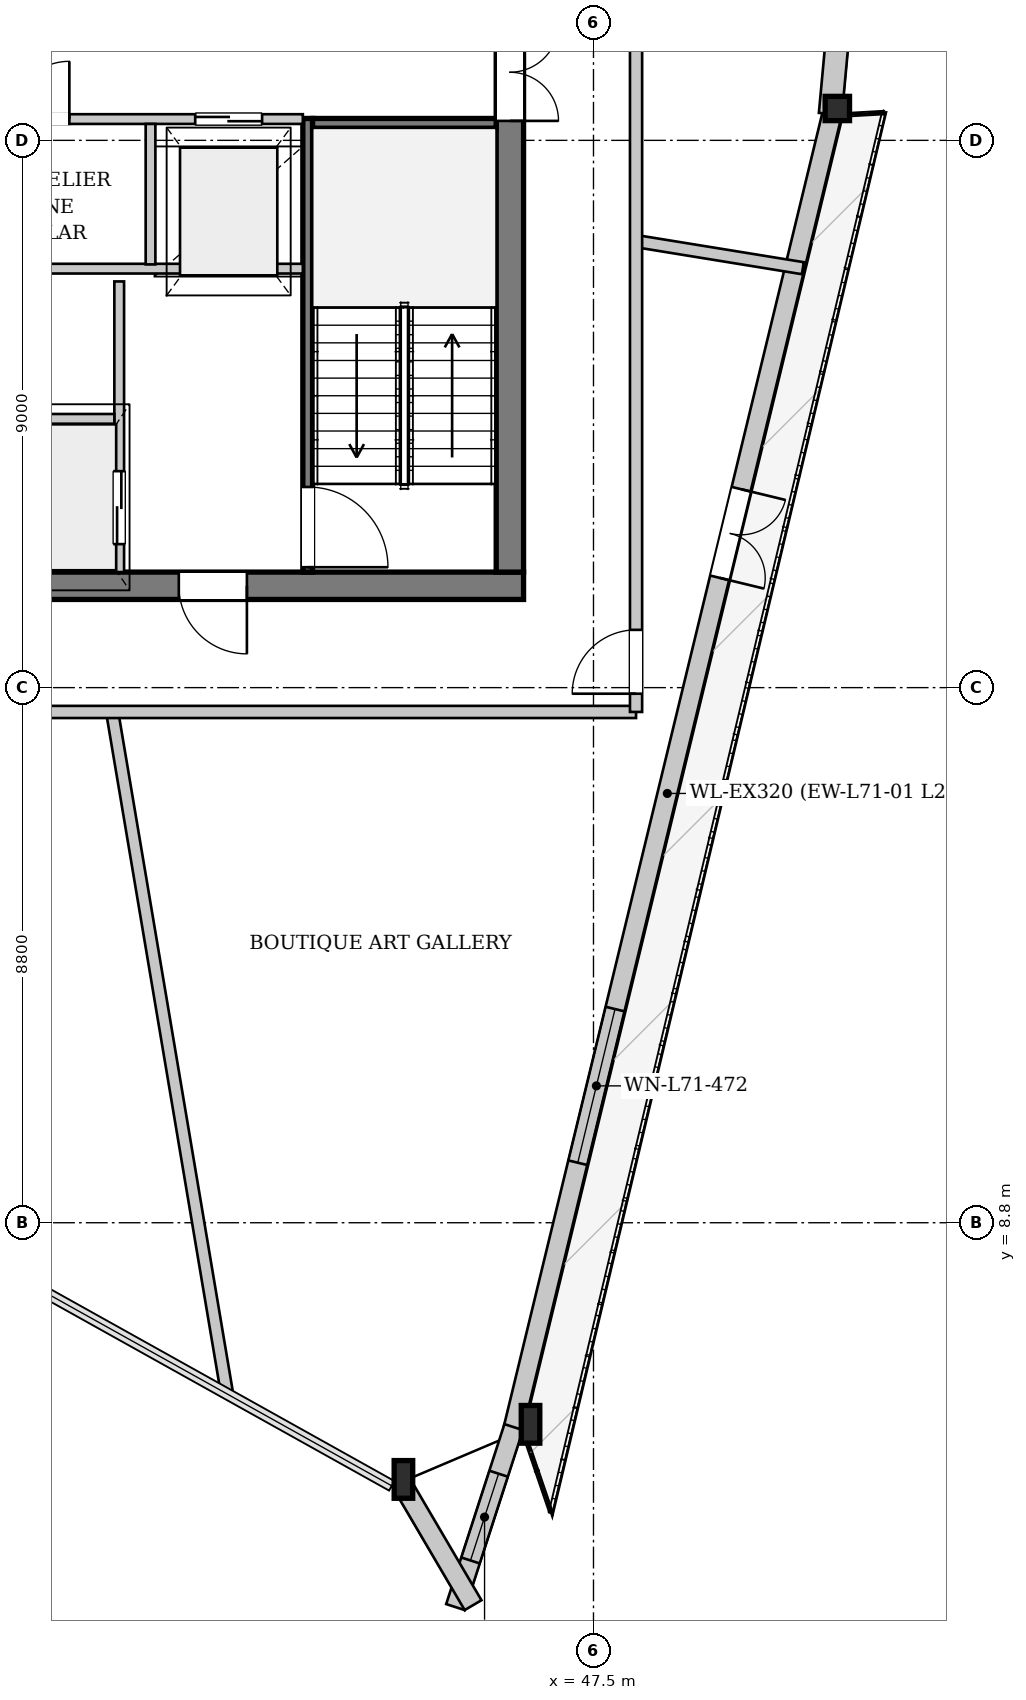
"""IFC4 building model, lengths in metres.
Left out: names, types, materials, properties, quantities, classifications, styles, units other than length and angle.
Written with IfcOpenShell. Run it as: python <this file> out.ifc"""

import sys

from ifc_helpers import new_model, si_unit, direction, frame, frame_2d, origin, origin_2d, place, context, subcontext, project, spatial, rectangle, i_section, extrude, source, transform, mapped, element, fill, save


model = new_model("IFC4")
c1 = context("Model", 3, precision=1e-05, world=origin(), true_north=direction((0.0, 1.0)))
c2 = subcontext(c1, "Body", "Model", "MODEL_VIEW")
j1 = project(units=[si_unit("LENGTHUNIT", "METRE"), si_unit("PLANEANGLEUNIT", "RADIAN")], contexts=[c1])
p1 = place(None, origin())
s1 = spatial("IfcSite", under=j1, at=p1, CompositionType="ELEMENT")
p2 = place(p1, origin())
s2 = spatial("IfcBuilding", under=s1, at=p2, CompositionType="ELEMENT")
p3 = place(p2, frame((0.0, 0.0, 266.9)))
s3 = spatial("IfcBuildingStorey", under=s2, at=p3, CompositionType="ELEMENT", Elevation=266.9)
m1 = source(origin(), c2, "Body", "SweptSolid", [
    extrude(i_section(OverallWidth=0.305, OverallDepth=0.62, WebThickness=0.021, FlangeThickness=0.04, at=origin_2d()), origin(), (0.0, 0.0, 1.0), 3.463),
])
p4 = place(p3, frame((44.182, 4.474, 0.0), z_axis=(0.111110442857, 0.060631333031, 0.991956809011), x_axis=(-0.479008221183, 0.877810414633, 0.0)))
e1 = element("IfcColumn", 1, at=p4, inside=s3, PredefinedType="COLUMN", context=c2, shape_type="MappedRepresentation", body=[
    mapped(m1, transform((0.0, 0.0, 0.0), x_axis=(1.0, 0.0, 0.0), y_axis=(0.0, 1.0, 0.0), z_axis=(0.0, 0.0, 1.0), scale=1.0)),
])
m2 = source(origin(), c2, "Body", "SweptSolid", [
    extrude(i_section(OverallWidth=0.305, OverallDepth=0.62, WebThickness=0.021, FlangeThickness=0.04, at=origin_2d()), origin(), (0.0, 0.0, 1.0), 3.449),
])
p5 = place(p3, frame((46.34, 5.39, 0.0), z_axis=(0.072476279359, 0.055206540918, 0.995841065015), x_axis=(-0.605949586805, 0.795503047292, 0.0)))
e2 = element("IfcColumn", 2, at=p5, inside=s3, PredefinedType="COLUMN", context=c2, shape_type="MappedRepresentation", body=[
    mapped(m2, transform((0.0, 0.0, 0.0), x_axis=(1.0, 0.0, 0.0), y_axis=(0.0, 1.0, 0.0), z_axis=(0.0, 0.0, 1.0), scale=1.0)),
])
m3 = source(origin(), c2, "Body", "SweptSolid", [
    extrude(i_section(OverallWidth=0.401, OverallDepth=0.399, WebThickness=0.022, FlangeThickness=0.034, at=origin_2d()), origin(), (0.0, 0.0, 1.0), 3.445),
])
p6 = place(p3, frame((51.585, 27.017, 0.0), z_axis=(-0.043442434865, 0.062151737972, 0.997120813302), x_axis=(-0.819626884118, -0.572897696653, 0.0)))
e3 = element("IfcColumn", 3, at=p6, inside=s3, PredefinedType="COLUMN", context=c2, shape_type="MappedRepresentation", body=[
    mapped(m3, transform((0.0, 0.0, 0.0), x_axis=(1.0, 0.0, 0.0), y_axis=(0.0, 1.0, 0.0), z_axis=(0.0, 0.0, 1.0), scale=1.0)),
])
p7 = place(p3, frame((51.43, 27.055, 0.0), z_axis=(0.0, 0.0, 1.0), x_axis=(-0.235712431361, -0.97182284893, 0.0)))
e4 = element("IfcWall", 4, at=p7, inside=s3, PredefinedType="SOLIDWALL", context=c2, shape_type="SweptSolid", body=[
    extrude(rectangle(XDim=22.254, YDim=0.32, at=frame_2d((11.127, 0.0))), origin(), (0.0, 0.0, 1.0), 2.872),
])
p8 = place(p7, frame((6.371, 0.0, 0.0)))
e5 = element("IfcOpeningElement", 5, at=p8, cuts=e4, PredefinedType="OPENING", context=c2, shape_type="SweptSolid", body=[
    extrude(rectangle(XDim=1.5, YDim=2.3, at=frame_2d((0.75, 1.15))), frame((0.0, 0.17, 0.0), z_axis=(0.0, -1.0, 0.0), x_axis=(1.0, 0.0, 0.0)), (0.0, 0.0, 1.0), 0.34),
])
p9 = place(p7, frame((15.168, 0.0, 0.402)))
e6 = element("IfcOpeningElement", 6, at=p9, cuts=e4, PredefinedType="OPENING", context=c2, shape_type="SweptSolid", body=[
    extrude(rectangle(XDim=2.6, YDim=2.35, at=frame_2d((1.3, 1.175))), frame((0.0, 0.17, 0.0), z_axis=(0.0, -1.0, 0.0), x_axis=(1.0, 0.0, 0.0)), (0.0, 0.0, 1.0), 0.34),
])
p10 = place(p3, frame((46.187, 5.439, 0.0), z_axis=(0.0, 0.0, 1.0), x_axis=(-0.307903872404, -0.951417471649, 0.0)))
e7 = element("IfcWall", 7, at=p10, inside=s3, PredefinedType="SOLIDWALL", context=c2, shape_type="SweptSolid", body=[
    extrude(rectangle(XDim=3.111, YDim=0.32, at=frame_2d((1.555, 0.0))), origin(), (0.0, 0.0, 1.0), 2.872),
])
p11 = place(p10, frame((0.805, 0.0, 0.452)))
e8 = element("IfcOpeningElement", 8, at=p11, cuts=e7, PredefinedType="OPENING", context=c2, shape_type="SweptSolid", body=[
    extrude(rectangle(XDim=1.5, YDim=2.3, at=frame_2d((0.75, 1.15))), frame((0.0, 0.17, 0.0), z_axis=(0.0, -1.0, 0.0), x_axis=(1.0, 0.0, 0.0)), (0.0, 0.0, 1.0), 0.34),
])
p12 = place(p3, frame((45.52, 2.511, 0.0), z_axis=(0.0, 0.0, 1.0), x_axis=(-0.506290522804, 0.862362978402, 0.0)))
e9 = element("IfcWall", 9, at=p12, inside=s3, PredefinedType="SOLIDWALL", context=c2, shape_type="SweptSolid", body=[
    extrude(rectangle(XDim=2.37, YDim=0.32, at=frame_2d((1.185, 0.0))), origin(), (0.0, 0.0, 1.0), 2.872),
])
p13 = place(p3, frame((53.439, 49.195, 0.0), z_axis=(0.0, 0.0, 1.0), x_axis=(-0.091800782473, -0.995777392964, 0.0)))
e10 = element("IfcWall", 10, at=p13, inside=s3, PredefinedType="SOLIDWALL", context=c2, shape_type="SweptSolid", body=[
    extrude(rectangle(XDim=22.254, YDim=0.38, at=frame_2d((11.127, 0.0))), origin(), (0.0, 0.0, 1.0), 2.872),
])
p14 = place(p13, frame((5.331, 0.0, 0.502)))
e11 = element("IfcOpeningElement", 11, at=p14, cuts=e10, PredefinedType="OPENING", context=c2, shape_type="SweptSolid", body=[
    extrude(rectangle(XDim=2.2, YDim=2.25, at=frame_2d((1.1, 1.125))), frame((0.0, 0.2, 0.0), z_axis=(0.0, -1.0, 0.0), x_axis=(1.0, 0.0, 0.0)), (0.0, 0.0, 1.0), 0.4),
])
p15 = place(p13, frame((14.923, 0.0, 0.502)))
e12 = element("IfcOpeningElement", 12, at=p15, cuts=e10, PredefinedType="OPENING", context=c2, shape_type="SweptSolid", body=[
    extrude(rectangle(XDim=2.2, YDim=2.25, at=frame_2d((1.1, 1.125))), frame((0.0, 0.2, 0.0), z_axis=(0.0, -1.0, 0.0), x_axis=(1.0, 0.0, 0.0)), (0.0, 0.0, 1.0), 0.4),
])
p16 = place(p3, frame((46.35, 19.275, 0.0), z_axis=(0.0, 0.0, 1.0), x_axis=(-1.0, 0.0, 0.0)))
e13 = element("IfcWall", 13, at=p16, inside=s3, PredefinedType="SHEAR", context=c2, shape_type="SweptSolid", body=[
    extrude(rectangle(XDim=16.7, YDim=0.45, at=frame_2d((8.35, 0.0))), origin(), (0.0, 0.0, 1.0), 3.38),
])
p17 = place(p16, frame((4.55, 0.0, 0.0)))
e14 = element("IfcOpeningElement", 14, at=p17, cuts=e13, PredefinedType="OPENING", context=c2, shape_type="SweptSolid", body=[
    extrude(rectangle(XDim=1.12, YDim=2.25, at=frame_2d((0.56, 1.125))), frame((0.0, 0.235, 0.0), z_axis=(0.0, -1.0, 0.0), x_axis=(1.0, 0.0, 0.0)), (0.0, 0.0, 1.0), 0.47),
])
p18 = place(p16, frame((11.05, 0.0, 0.0)))
e15 = element("IfcOpeningElement", 15, at=p18, cuts=e13, PredefinedType="OPENING", context=c2, shape_type="SweptSolid", body=[
    extrude(rectangle(XDim=1.12, YDim=2.25, at=frame_2d((0.56, 1.125))), frame((0.0, 0.235, 0.0), z_axis=(0.0, -1.0, 0.0), x_axis=(1.0, 0.0, 0.0)), (0.0, 0.0, 1.0), 0.47),
])
p19 = place(p3, frame((46.125, 33.7, 0.0), z_axis=(0.0, 0.0, 1.0), x_axis=(0.0, -1.0, 0.0)))
e16 = element("IfcWall", 16, at=p19, inside=s3, PredefinedType="SHEAR", context=c2, shape_type="SweptSolid", body=[
    extrude(rectangle(XDim=14.2, YDim=0.45, at=frame_2d((7.1, 0.0))), origin(), (0.0, 0.0, 1.0), 3.38),
])
p20 = place(p19, frame((5.18, 0.0, 0.0)))
e17 = element("IfcOpeningElement", 17, at=p20, cuts=e16, PredefinedType="OPENING", context=c2, shape_type="SweptSolid", body=[
    extrude(rectangle(XDim=1.6, YDim=2.2, at=frame_2d((0.8, 1.1))), frame((0.0, 0.235, 0.0), z_axis=(0.0, -1.0, 0.0), x_axis=(1.0, 0.0, 0.0)), (0.0, 0.0, 1.0), 0.47),
])
p21 = place(p19, frame((2.05, 0.0, 0.0)))
e18 = element("IfcOpeningElement", 18, at=p21, cuts=e16, PredefinedType="OPENING", context=c2, shape_type="SweptSolid", body=[
    extrude(rectangle(XDim=0.95, YDim=2.1, at=frame_2d((0.475, 1.05))), frame((0.0, 0.235, 0.0), z_axis=(0.0, -1.0, 0.0), x_axis=(1.0, 0.0, 0.0)), (0.0, 0.0, 1.0), 0.47),
])
p22 = place(p3, frame((42.8, 26.96, 0.0), z_axis=(0.0, 0.0, 1.0), x_axis=(0.0, -1.0, 0.0)))
e19 = element("IfcWall", 19, at=p22, inside=s3, PredefinedType="PARTITIONING", context=c2, shape_type="SweptSolid", body=[
    extrude(rectangle(XDim=7.46, YDim=0.16, at=frame_2d((3.73, 0.0))), origin(), (0.0, 0.0, 1.0), 3.38),
])
p23 = place(p22, frame((6.06, 0.0, 0.0)))
e20 = element("IfcOpeningElement", 20, at=p23, cuts=e19, PredefinedType="OPENING", context=c2, shape_type="SweptSolid", body=[
    extrude(rectangle(XDim=1.32, YDim=2.2, at=frame_2d((0.66, 1.1))), frame((0.0, 0.09, 0.0), z_axis=(0.0, -1.0, 0.0), x_axis=(1.0, 0.0, 0.0)), (0.0, 0.0, 1.0), 0.18),
])
p24 = place(p3, frame((42.88, 26.88, 0.0), z_axis=(0.0, 0.0, 1.0), x_axis=(1.0, 0.0, 0.0)))
e21 = element("IfcWall", 21, at=p24, inside=s3, PredefinedType="PARTITIONING", context=c2, shape_type="SweptSolid", body=[
    extrude(rectangle(XDim=3.02, YDim=0.16, at=frame_2d((1.51, 0.0))), origin(), (0.0, 0.0, 1.0), 3.38),
])
p25 = place(p3, frame((39.7, 24.28, 0.0), z_axis=(0.0, 0.0, 1.0), x_axis=(0.0, -1.0, 0.0)))
e22 = element("IfcWall", 22, at=p25, inside=s3, PredefinedType="PARTITIONING", context=c2, shape_type="SweptSolid", body=[
    extrude(rectangle(XDim=4.78, YDim=0.16, at=frame_2d((2.39, 0.0))), origin(), (0.0, 0.0, 1.0), 3.38),
])
p26 = place(p25, frame((3.12, 0.0, 0.0)))
e23 = element("IfcOpeningElement", 23, at=p26, cuts=e22, PredefinedType="OPENING", context=c2, shape_type="SweptSolid", body=[
    extrude(rectangle(XDim=1.2, YDim=2.2, at=frame_2d((0.6, 1.1))), frame((0.0, 0.09, 0.0), z_axis=(0.0, -1.0, 0.0), x_axis=(1.0, 0.0, 0.0)), (0.0, 0.0, 1.0), 0.18),
])
p27 = place(p3, frame((36.38, 22.02, 0.0), z_axis=(0.0, 0.0, 1.0), x_axis=(1.0, 0.0, 0.0)))
e24 = element("IfcWall", 24, at=p27, inside=s3, PredefinedType="PARTITIONING", context=c2, shape_type="SweptSolid", body=[
    extrude(rectangle(XDim=3.24, YDim=0.16, at=frame_2d((1.62, 0.0))), origin(), (0.0, 0.0, 1.0), 3.38),
])
p28 = place(p3, frame((33.28, 24.49, 0.0), z_axis=(0.0, 0.0, 1.0), x_axis=(1.0, 0.0, 0.0)))
e25 = element("IfcWall", 25, at=p28, inside=s3, PredefinedType="PARTITIONING", context=c2, shape_type="SweptSolid", body=[
    extrude(rectangle(XDim=9.44, YDim=0.16, at=frame_2d((4.72, 0.0))), origin(), (0.0, 0.0, 1.0), 3.38),
])
p29 = place(p3, frame((33.28, 26.95, 0.0), z_axis=(0.0, 0.0, 1.0), x_axis=(1.0, 0.0, 0.0)))
e26 = element("IfcWall", 26, at=p29, inside=s3, PredefinedType="PARTITIONING", context=c2, shape_type="SweptSolid", body=[
    extrude(rectangle(XDim=9.44, YDim=0.16, at=frame_2d((4.72, 0.0))), origin(), (0.0, 0.0, 1.0), 3.38),
])
p30 = place(p29, frame((1.2, 0.0, 0.0)))
e27 = element("IfcOpeningElement", 27, at=p30, cuts=e26, PredefinedType="OPENING", context=c2, shape_type="SweptSolid", body=[
    extrude(rectangle(XDim=0.95, YDim=2.1, at=frame_2d((0.475, 1.05))), frame((0.0, 0.09, 0.0), z_axis=(0.0, -1.0, 0.0), x_axis=(1.0, 0.0, 0.0)), (0.0, 0.0, 1.0), 0.18),
])
p31 = place(p29, frame((4.65, 0.0, 0.0)))
e28 = element("IfcOpeningElement", 28, at=p31, cuts=e26, PredefinedType="OPENING", context=c2, shape_type="SweptSolid", body=[
    extrude(rectangle(XDim=0.95, YDim=2.1, at=frame_2d((0.475, 1.05))), frame((0.0, 0.09, 0.0), z_axis=(0.0, -1.0, 0.0), x_axis=(1.0, 0.0, 0.0)), (0.0, 0.0, 1.0), 0.18),
])
p32 = place(p29, frame((7.67, 0.0, 0.0)))
e29 = element("IfcOpeningElement", 29, at=p32, cuts=e26, PredefinedType="OPENING", context=c2, shape_type="SweptSolid", body=[
    extrude(rectangle(XDim=1.1, YDim=2.2, at=frame_2d((0.55, 1.1))), frame((0.0, 0.09, 0.0), z_axis=(0.0, -1.0, 0.0), x_axis=(1.0, 0.0, 0.0)), (0.0, 0.0, 1.0), 0.18),
])
p33 = place(p3, frame((40.215, 24.56, 0.0), z_axis=(0.0, 0.0, 1.0), x_axis=(0.0, 1.0, 0.0)))
e30 = element("IfcWall", 30, at=p33, inside=s3, PredefinedType="PARTITIONING", context=c2, shape_type="SweptSolid", body=[
    extrude(rectangle(XDim=2.31, YDim=0.16, at=frame_2d((1.155, 0.0))), origin(), (0.0, 0.0, 1.0), 3.38),
])
p34 = place(p3, frame((39.584, 17.2, 0.0), z_axis=(0.0, 0.0, 1.0), x_axis=(0.166152121506, -0.98610013311, 0.0)))
e31 = element("IfcWall", 31, at=p34, inside=s3, PredefinedType="PARTITIONING", context=c2, shape_type="SweptSolid", body=[
    extrude(rectangle(XDim=11.335, YDim=0.2, at=frame_2d((5.667, 0.0))), origin(), (0.0, 0.0, 1.0), 3.38),
])
p35 = place(p3, frame((48.2, 24.943, 0.0), z_axis=(0.0, 0.0, 1.0), x_axis=(0.987066811554, -0.160309418091, 0.0)))
e32 = element("IfcWall", 32, at=p35, inside=s3, PredefinedType="PARTITIONING", context=c2, shape_type="SweptSolid", body=[
    extrude(rectangle(XDim=2.779, YDim=0.2, at=frame_2d((1.39, 0.0))), origin(), (0.0, 0.0, 1.0), 3.38),
])
p36 = place(p3, frame((27.8, 17.2, 0.0), z_axis=(0.0, 0.0, 1.0), x_axis=(1.0, 0.0, 0.0)))
e33 = element("IfcWall", 33, at=p36, inside=s3, PredefinedType="PARTITIONING", context=c2, shape_type="SweptSolid", body=[
    extrude(rectangle(XDim=20.4, YDim=0.2, at=frame_2d((10.2, 0.0))), origin(), (0.0, 0.0, 1.0), 3.38),
])
p37 = place(p36, frame((5.109, 0.0, 0.0)))
e34 = element("IfcOpeningElement", 34, at=p37, cuts=e33, PredefinedType="OPENING", context=c2, shape_type="SweptSolid", body=[
    extrude(rectangle(XDim=1.05, YDim=2.2, at=frame_2d((0.525, 1.1))), frame((0.0, 0.11, 0.0), z_axis=(0.0, -1.0, 0.0), x_axis=(1.0, 0.0, 0.0)), (0.0, 0.0, 1.0), 0.22),
])
p38 = place(p3, frame((48.2, 17.2, 0.0), z_axis=(0.0, 0.0, 1.0), x_axis=(0.0, 1.0, 0.0)))
e35 = element("IfcWall", 35, at=p38, inside=s3, PredefinedType="PARTITIONING", context=c2, shape_type="SweptSolid", body=[
    extrude(rectangle(XDim=18.8, YDim=0.2, at=frame_2d((9.4, 0.0))), origin(), (0.0, 0.0, 1.0), 3.065),
])
p39 = place(p38, frame((0.3, 0.0, 0.0)))
e36 = element("IfcOpeningElement", 36, at=p39, cuts=e35, PredefinedType="OPENING", context=c2, shape_type="SweptSolid", body=[
    extrude(rectangle(XDim=1.05, YDim=2.2, at=frame_2d((0.525, 1.1))), frame((0.0, 0.11, 0.0), z_axis=(0.0, -1.0, 0.0), x_axis=(1.0, 0.0, 0.0)), (0.0, 0.0, 1.0), 0.22),
])
p40 = place(p38, frame((13.811, 0.0, 0.0)))
e37 = element("IfcOpeningElement", 37, at=p40, cuts=e35, PredefinedType="OPENING", context=c2, shape_type="SweptSolid", body=[
    extrude(rectangle(XDim=1.05, YDim=2.2, at=frame_2d((0.525, 1.1))), frame((0.0, 0.11, 0.0), z_axis=(0.0, -1.0, 0.0), x_axis=(1.0, 0.0, 0.0)), (0.0, 0.0, 1.0), 0.22),
])
m4 = source(origin(), c2, "Body", "SweptSolid", [
    extrude(rectangle(XDim=1.5, YDim=2.3, at=frame_2d((0.75, 1.15))), frame((0.0, 0.025, 0.0), z_axis=(0.0, -1.0, 0.0), x_axis=(1.0, 0.0, 0.0)), (0.0, 0.0, 1.0), 0.05),
])
p41 = place(p8, origin())
e38 = element("IfcDoor", 38, at=p41, inside=s3, OperationType="DOUBLE_DOOR_SINGLE_SWING", PredefinedType="DOOR", context=c2, shape_type="MappedRepresentation", body=[
    mapped(m4, transform((0.0, 0.0, 0.0), x_axis=(1.0, 0.0, 0.0), y_axis=(0.0, 1.0, 0.0), z_axis=(0.0, 0.0, 1.0), scale=1.0)),
])
fill(e5, e38)
m5 = source(origin(), c2, "Body", "SweptSolid", [
    extrude(rectangle(XDim=2.6, YDim=2.35, at=frame_2d((1.3, 1.175))), frame((0.0, 0.03, 0.0), z_axis=(0.0, -1.0, 0.0), x_axis=(1.0, 0.0, 0.0)), (0.0, 0.0, 1.0), 0.06),
])
p42 = place(p9, origin())
e39 = element("IfcWindow", 39, at=p42, inside=s3, PartitioningType="SINGLE_PANEL", PredefinedType="WINDOW", context=c2, shape_type="MappedRepresentation", body=[
    mapped(m5, transform((0.0, 0.0, 0.0), x_axis=(1.0, 0.0, 0.0), y_axis=(0.0, 1.0, 0.0), z_axis=(0.0, 0.0, 1.0), scale=1.0)),
])
fill(e6, e39)
m6 = source(origin(), c2, "Body", "SweptSolid", [
    extrude(rectangle(XDim=1.5, YDim=2.3, at=frame_2d((0.75, 1.15))), frame((0.0, 0.03, 0.0), z_axis=(0.0, -1.0, 0.0), x_axis=(1.0, 0.0, 0.0)), (0.0, 0.0, 1.0), 0.06),
])
p43 = place(p11, origin())
e40 = element("IfcWindow", 40, at=p43, inside=s3, PartitioningType="SINGLE_PANEL", PredefinedType="WINDOW", context=c2, shape_type="MappedRepresentation", body=[
    mapped(m6, transform((0.0, 0.0, 0.0), x_axis=(1.0, 0.0, 0.0), y_axis=(0.0, 1.0, 0.0), z_axis=(0.0, 0.0, 1.0), scale=1.0)),
])
fill(e8, e40)
m7 = source(origin(), c2, "Body", "SweptSolid", [
    extrude(rectangle(XDim=1.12, YDim=2.25, at=frame_2d((0.56, 1.125))), frame((0.0, 0.025, 0.0), z_axis=(0.0, -1.0, 0.0), x_axis=(1.0, 0.0, 0.0)), (0.0, 0.0, 1.0), 0.05),
])
p44 = place(p17, origin())
e41 = element("IfcDoor", 41, at=p44, inside=s3, OperationType="SINGLE_SWING_LEFT", PredefinedType="DOOR", context=c2, shape_type="MappedRepresentation", body=[
    mapped(m7, transform((0.0, 0.0, 0.0), x_axis=(1.0, 0.0, 0.0), y_axis=(0.0, 1.0, 0.0), z_axis=(0.0, 0.0, 1.0), scale=1.0)),
])
fill(e14, e41)
m8 = source(origin(), c2, "Body", "SweptSolid", [
    extrude(rectangle(XDim=1.6, YDim=2.2, at=frame_2d((0.8, 1.1))), frame((0.0, 0.025, 0.0), z_axis=(0.0, -1.0, 0.0), x_axis=(1.0, 0.0, 0.0)), (0.0, 0.0, 1.0), 0.05),
])
p45 = place(p20, origin())
e42 = element("IfcDoor", 42, at=p45, inside=s3, OperationType="DOUBLE_DOOR_SINGLE_SWING", PredefinedType="DOOR", context=c2, shape_type="MappedRepresentation", body=[
    mapped(m8, transform((0.0, 0.0, 0.0), x_axis=(1.0, 0.0, 0.0), y_axis=(0.0, 1.0, 0.0), z_axis=(0.0, 0.0, 1.0), scale=1.0)),
])
fill(e17, e42)
m9 = source(origin(), c2, "Body", "SweptSolid", [
    extrude(rectangle(XDim=1.32, YDim=2.2, at=frame_2d((0.66, 1.1))), frame((0.0, 0.025, 0.0), z_axis=(0.0, -1.0, 0.0), x_axis=(1.0, 0.0, 0.0)), (0.0, 0.0, 1.0), 0.05),
])
p46 = place(p23, origin())
e43 = element("IfcDoor", 43, at=p46, inside=s3, OperationType="SINGLE_SWING_RIGHT", PredefinedType="DOOR", context=c2, shape_type="MappedRepresentation", body=[
    mapped(m9, transform((0.0, 0.0, 0.0), x_axis=(1.0, 0.0, 0.0), y_axis=(0.0, 1.0, 0.0), z_axis=(0.0, 0.0, 1.0), scale=1.0)),
])
fill(e20, e43)
m10 = source(origin(), c2, "Body", "SweptSolid", [
    extrude(rectangle(XDim=1.2, YDim=2.2, at=frame_2d((0.6, 1.1))), frame((0.0, 0.025, 0.0), z_axis=(0.0, -1.0, 0.0), x_axis=(1.0, 0.0, 0.0)), (0.0, 0.0, 1.0), 0.05),
])
p47 = place(p26, origin())
e44 = element("IfcDoor", 44, at=p47, inside=s3, OperationType="DOUBLE_DOOR_SLIDING", PredefinedType="DOOR", context=c2, shape_type="MappedRepresentation", body=[
    mapped(m10, transform((0.0, 0.0, 0.0), x_axis=(1.0, 0.0, 0.0), y_axis=(0.0, 1.0, 0.0), z_axis=(0.0, 0.0, 1.0), scale=1.0)),
])
fill(e23, e44)
m11 = source(origin(), c2, "Body", "SweptSolid", [
    extrude(rectangle(XDim=0.95, YDim=2.1, at=frame_2d((0.475, 1.05))), frame((0.0, 0.025, 0.0), z_axis=(0.0, -1.0, 0.0), x_axis=(1.0, 0.0, 0.0)), (0.0, 0.0, 1.0), 0.05),
])
p48 = place(p31, origin())
e45 = element("IfcDoor", 45, at=p48, inside=s3, OperationType="SINGLE_SWING_RIGHT", PredefinedType="DOOR", context=c2, shape_type="MappedRepresentation", body=[
    mapped(m11, transform((0.0, 0.0, 0.0), x_axis=(1.0, 0.0, 0.0), y_axis=(0.0, 1.0, 0.0), z_axis=(0.0, 0.0, 1.0), scale=1.0)),
])
fill(e28, e45)
m12 = source(origin(), c2, "Body", "SweptSolid", [
    extrude(rectangle(XDim=1.1, YDim=2.2, at=frame_2d((0.55, 1.1))), frame((0.0, 0.025, 0.0), z_axis=(0.0, -1.0, 0.0), x_axis=(1.0, 0.0, 0.0)), (0.0, 0.0, 1.0), 0.05),
])
p49 = place(p32, origin())
e46 = element("IfcDoor", 46, at=p49, inside=s3, OperationType="DOUBLE_DOOR_SLIDING", PredefinedType="DOOR", context=c2, shape_type="MappedRepresentation", body=[
    mapped(m12, transform((0.0, 0.0, 0.0), x_axis=(1.0, 0.0, 0.0), y_axis=(0.0, 1.0, 0.0), z_axis=(0.0, 0.0, 1.0), scale=1.0)),
])
fill(e29, e46)
m13 = source(origin(), c2, "Body", "SweptSolid", [
    extrude(rectangle(XDim=1.05, YDim=2.2, at=frame_2d((0.525, 1.1))), frame((0.0, 0.025, 0.0), z_axis=(0.0, -1.0, 0.0), x_axis=(1.0, 0.0, 0.0)), (0.0, 0.0, 1.0), 0.05),
])
p50 = place(p39, origin())
e47 = element("IfcDoor", 47, at=p50, inside=s3, OperationType="SINGLE_SWING_LEFT", PredefinedType="DOOR", context=c2, shape_type="MappedRepresentation", body=[
    mapped(m13, transform((0.0, 0.0, 0.0), x_axis=(1.0, 0.0, 0.0), y_axis=(0.0, 1.0, 0.0), z_axis=(0.0, 0.0, 1.0), scale=1.0)),
])
fill(e36, e47)
save(model, sys.argv[1])
